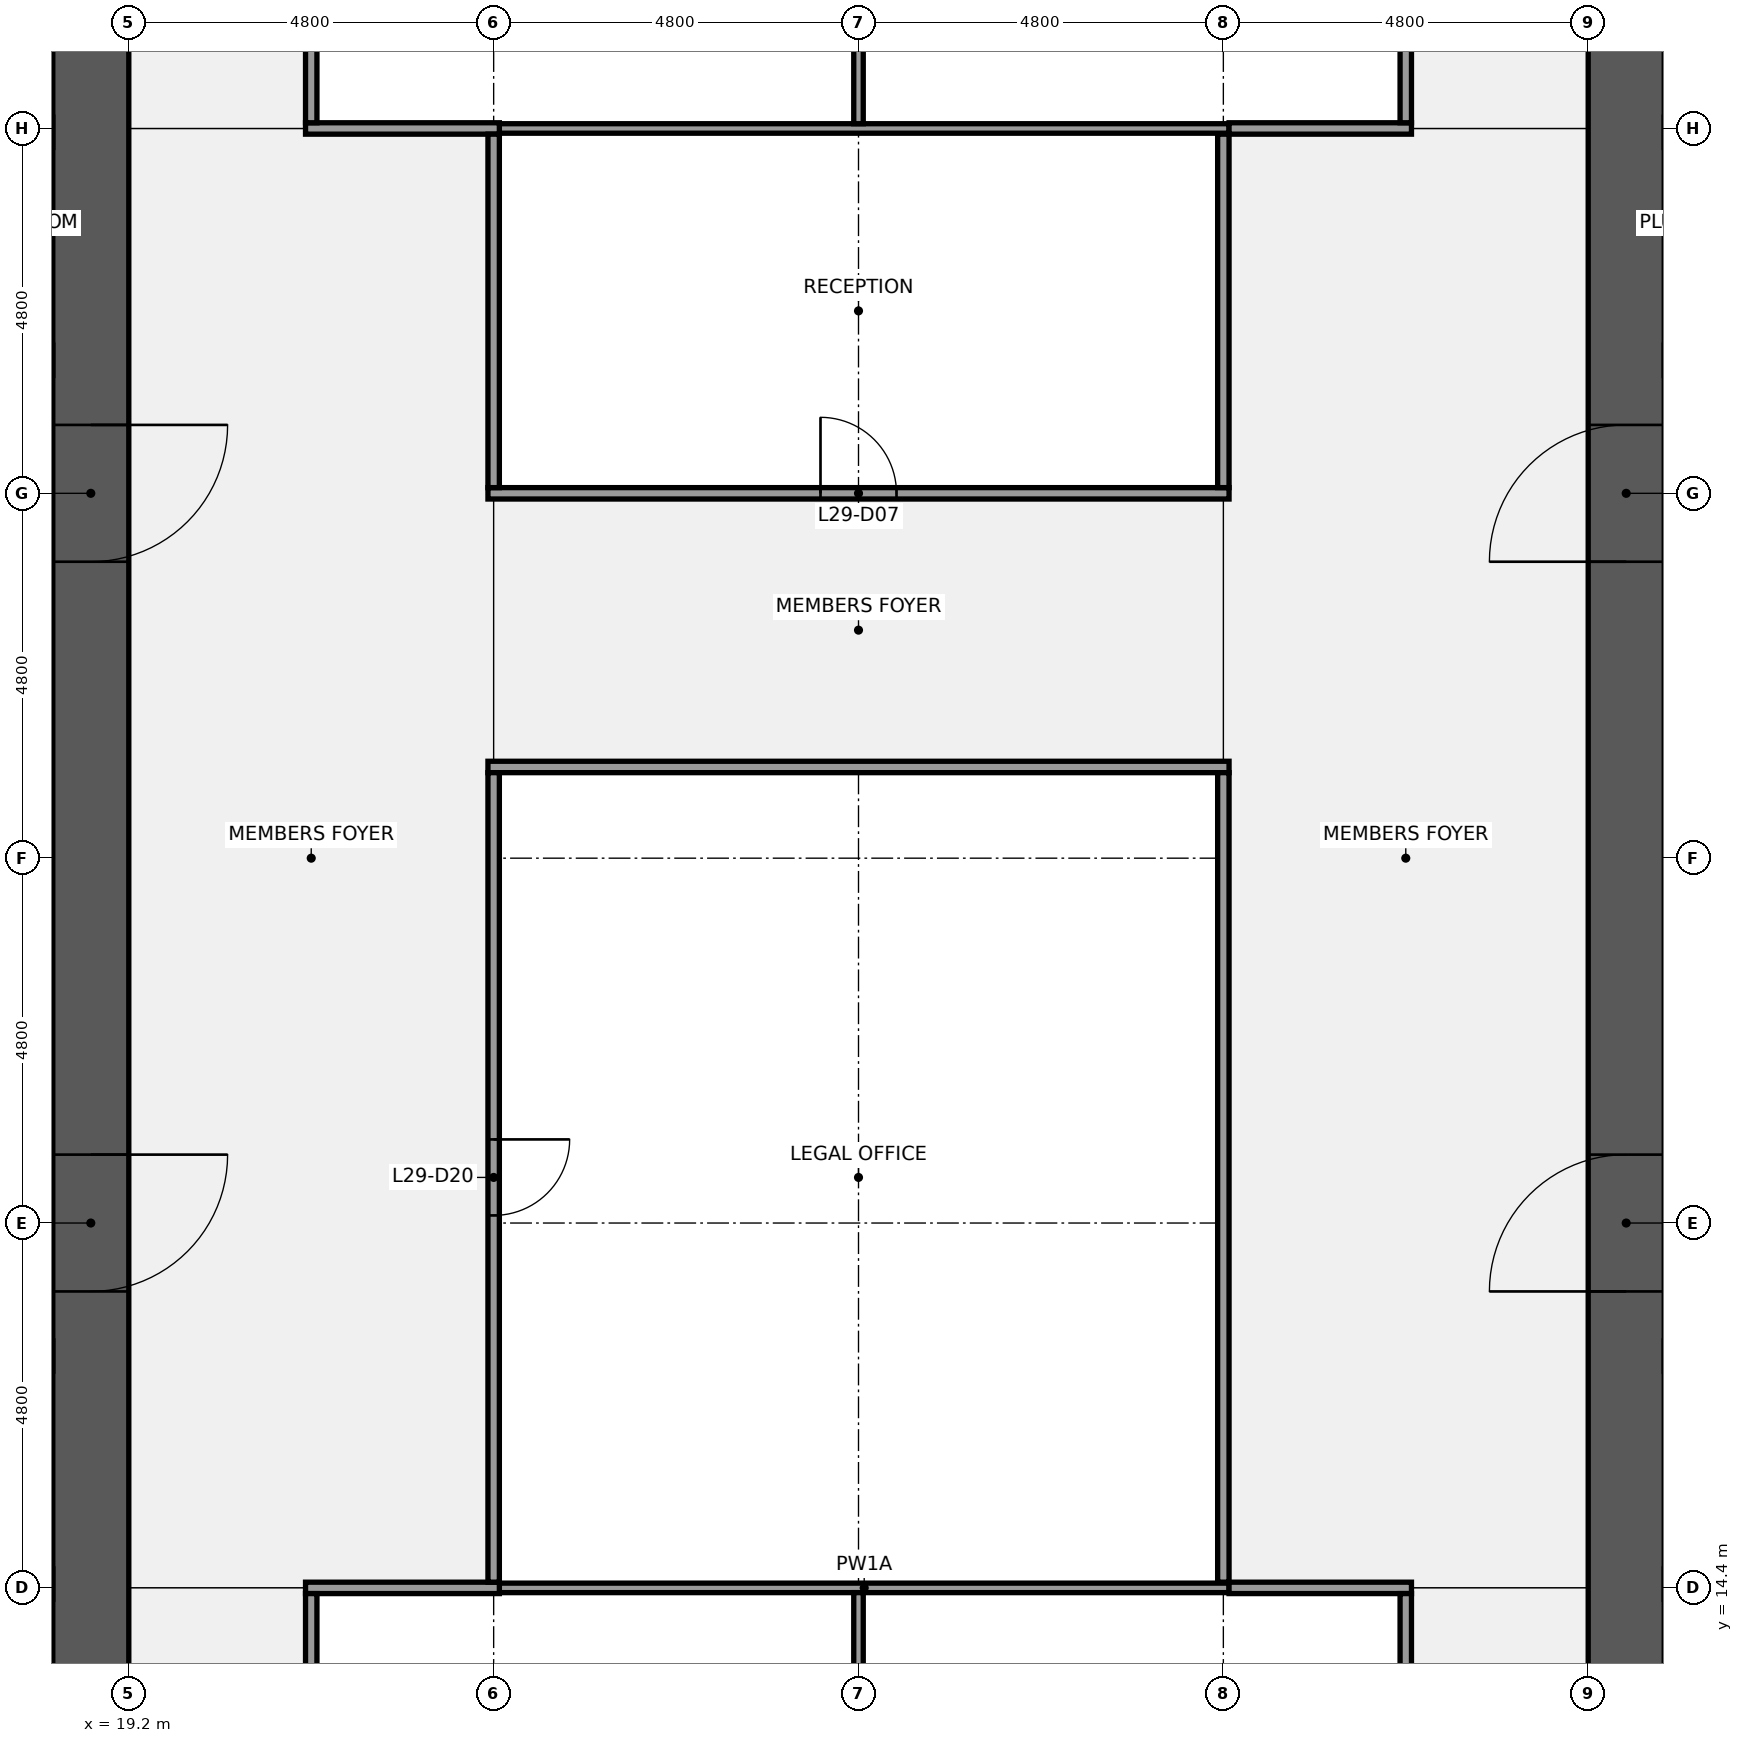
"""IFC4 building model, lengths in metres.
Left out: names, types, materials, properties, quantities, classifications, styles, units other than length and angle.
Written with IfcOpenShell. Run it as: python <this file> out.ifc"""

import sys

from ifc_helpers import new_model, si_unit, direction, frame, frame_2d, origin, place, context, subcontext, project, spatial, rectangle, extrude, element, fill, save


model = new_model("IFC4")
c1 = context("Model", 3, precision=1e-05, world=origin(), true_north=direction((0.0, 1.0)))
c2 = subcontext(c1, "Body", "Model", "MODEL_VIEW")
j1 = project(units=[si_unit("LENGTHUNIT", "METRE"), si_unit("PLANEANGLEUNIT", "RADIAN")], contexts=[c1])
p1 = place(None, origin())
s1 = spatial("IfcSite", under=j1, at=p1, CompositionType="ELEMENT")
p2 = place(p1, origin())
s2 = spatial("IfcBuilding", under=s1, at=p2, CompositionType="ELEMENT")
p3 = place(p2, frame((0.0, 0.0, 136.1)))
s3 = spatial("IfcBuildingStorey", under=s2, at=p3, CompositionType="ELEMENT", Elevation=136.1)
p4 = place(p3, frame((18.7, 38.4, 0.0), z_axis=(0.0, 0.0, 1.0), x_axis=(0.0, -1.0, 0.0)))
e1 = element("IfcWall", 1, at=p4, inside=s3, PredefinedType="SHEAR", context=c2, shape_type="SweptSolid", body=[
    extrude(rectangle(XDim=28.8, YDim=1.0, at=frame_2d((14.4, 0.0))), origin(), (0.0, 0.0, 1.0), 3.84),
])
p5 = place(p4, frame((18.3, 0.0, 0.0)))
e2 = element("IfcOpeningElement", 2, at=p5, cuts=e1, PredefinedType="OPENING", context=c2, shape_type="SweptSolid", body=[
    extrude(rectangle(XDim=1.8, YDim=2.1, at=frame_2d((0.9, 1.05))), frame((0.0, 0.51, 0.0), z_axis=(0.0, -1.0, 0.0), x_axis=(1.0, 0.0, 0.0)), (0.0, 0.0, 1.0), 1.02),
])
p6 = place(p4, frame((8.7, 0.0, 0.0)))
e3 = element("IfcOpeningElement", 3, at=p6, cuts=e1, PredefinedType="OPENING", context=c2, shape_type="SweptSolid", body=[
    extrude(rectangle(XDim=1.8, YDim=2.1, at=frame_2d((0.9, 1.05))), frame((0.0, 0.51, 0.0), z_axis=(0.0, -1.0, 0.0), x_axis=(1.0, 0.0, 0.0)), (0.0, 0.0, 1.0), 1.02),
])
p7 = place(p3, frame((1.0, 14.45, 0.0), z_axis=(0.0, 0.0, 1.0), x_axis=(1.0, 0.0, 0.0)))
e4 = element("IfcWall", 4, at=p7, inside=s3, PredefinedType="SHEAR", context=c2, shape_type="SweptSolid", body=[
    extrude(rectangle(XDim=17.2, YDim=0.4, at=frame_2d((8.6, 0.0))), origin(), (0.0, 0.0, 1.0), 3.84),
])
p8 = place(p3, frame((1.0, 17.45, 0.0), z_axis=(0.0, 0.0, 1.0), x_axis=(1.0, 0.0, 0.0)))
e5 = element("IfcWall", 5, at=p8, inside=s3, PredefinedType="SHEAR", context=c2, shape_type="SweptSolid", body=[
    extrude(rectangle(XDim=17.2, YDim=0.4, at=frame_2d((8.6, 0.0))), origin(), (0.0, 0.0, 1.0), 3.84),
])
p9 = place(p8, frame((0.762, 0.0, 0.0)))
e6 = element("IfcOpeningElement", 6, at=p9, cuts=e5, PredefinedType="OPENING", context=c2, shape_type="SweptSolid", body=[
    extrude(rectangle(XDim=1.0, YDim=2.1, at=frame_2d((0.5, 1.05))), frame((0.0, 0.21, 0.0), z_axis=(0.0, -1.0, 0.0), x_axis=(1.0, 0.0, 0.0)), (0.0, 0.0, 1.0), 0.42),
])
p10 = place(p8, frame((4.2, 0.0, 0.0)))
e7 = element("IfcOpeningElement", 7, at=p10, cuts=e5, PredefinedType="OPENING", context=c2, shape_type="SweptSolid", body=[
    extrude(rectangle(XDim=1.0, YDim=2.1, at=frame_2d((0.5, 1.05))), frame((0.0, 0.21, 0.0), z_axis=(0.0, -1.0, 0.0), x_axis=(1.0, 0.0, 0.0)), (0.0, 0.0, 1.0), 0.42),
])
p11 = place(p8, frame((8.4, 0.0, 0.0)))
e8 = element("IfcOpeningElement", 8, at=p11, cuts=e5, PredefinedType="OPENING", context=c2, shape_type="SweptSolid", body=[
    extrude(rectangle(XDim=1.0, YDim=2.1, at=frame_2d((0.5, 1.05))), frame((0.0, 0.21, 0.0), z_axis=(0.0, -1.0, 0.0), x_axis=(1.0, 0.0, 0.0)), (0.0, 0.0, 1.0), 0.42),
])
p12 = place(p8, frame((13.637, 0.0, 0.0)))
e9 = element("IfcOpeningElement", 9, at=p12, cuts=e5, PredefinedType="OPENING", context=c2, shape_type="SweptSolid", body=[
    extrude(rectangle(XDim=1.0, YDim=2.1, at=frame_2d((0.5, 1.05))), frame((0.0, 0.21, 0.0), z_axis=(0.0, -1.0, 0.0), x_axis=(1.0, 0.0, 0.0)), (0.0, 0.0, 1.0), 0.42),
])
p13 = place(p3, frame((1.0, 30.55, 0.0), z_axis=(0.0, 0.0, 1.0), x_axis=(1.0, 0.0, 0.0)))
e10 = element("IfcWall", 10, at=p13, inside=s3, PredefinedType="SHEAR", context=c2, shape_type="SweptSolid", body=[
    extrude(rectangle(XDim=17.2, YDim=0.4, at=frame_2d((8.6, 0.0))), origin(), (0.0, 0.0, 1.0), 3.84),
])
p14 = place(p13, frame((1.962, 0.0, 0.0)))
e11 = element("IfcOpeningElement", 11, at=p14, cuts=e10, PredefinedType="OPENING", context=c2, shape_type="SweptSolid", body=[
    extrude(rectangle(XDim=1.0, YDim=2.1, at=frame_2d((0.5, 1.05))), frame((0.0, 0.21, 0.0), z_axis=(0.0, -1.0, 0.0), x_axis=(1.0, 0.0, 0.0)), (0.0, 0.0, 1.0), 0.42),
])
p15 = place(p13, frame((6.6, 0.0, 0.0)))
e12 = element("IfcOpeningElement", 12, at=p15, cuts=e10, PredefinedType="OPENING", context=c2, shape_type="SweptSolid", body=[
    extrude(rectangle(XDim=1.0, YDim=2.1, at=frame_2d((0.5, 1.05))), frame((0.0, 0.21, 0.0), z_axis=(0.0, -1.0, 0.0), x_axis=(1.0, 0.0, 0.0)), (0.0, 0.0, 1.0), 0.42),
])
p16 = place(p13, frame((11.1, 0.0, 0.0)))
e13 = element("IfcOpeningElement", 13, at=p16, cuts=e10, PredefinedType="OPENING", context=c2, shape_type="SweptSolid", body=[
    extrude(rectangle(XDim=1.0, YDim=2.1, at=frame_2d((0.5, 1.05))), frame((0.0, 0.21, 0.0), z_axis=(0.0, -1.0, 0.0), x_axis=(1.0, 0.0, 0.0)), (0.0, 0.0, 1.0), 0.42),
])
p17 = place(p13, frame((15.137, 0.0, 0.0)))
e14 = element("IfcOpeningElement", 14, at=p17, cuts=e10, PredefinedType="OPENING", context=c2, shape_type="SweptSolid", body=[
    extrude(rectangle(XDim=1.0, YDim=2.1, at=frame_2d((0.5, 1.05))), frame((0.0, 0.21, 0.0), z_axis=(0.0, -1.0, 0.0), x_axis=(1.0, 0.0, 0.0)), (0.0, 0.0, 1.0), 0.42),
])
p18 = place(p3, frame((1.0, 33.55, 0.0), z_axis=(0.0, 0.0, 1.0), x_axis=(1.0, 0.0, 0.0)))
e15 = element("IfcWall", 15, at=p18, inside=s3, PredefinedType="SHEAR", context=c2, shape_type="SweptSolid", body=[
    extrude(rectangle(XDim=17.2, YDim=0.4, at=frame_2d((8.6, 0.0))), origin(), (0.0, 0.0, 1.0), 3.84),
])
p19 = place(p3, frame((38.9, 9.6, 0.0), z_axis=(0.0, 0.0, 1.0), x_axis=(0.0, 1.0, 0.0)))
e16 = element("IfcWall", 16, at=p19, inside=s3, PredefinedType="SHEAR", context=c2, shape_type="SweptSolid", body=[
    extrude(rectangle(XDim=28.8, YDim=1.0, at=frame_2d((14.4, 0.0))), origin(), (0.0, 0.0, 1.0), 3.84),
])
p20 = place(p19, frame((8.7, 0.0, 0.0)))
e17 = element("IfcOpeningElement", 17, at=p20, cuts=e16, PredefinedType="OPENING", context=c2, shape_type="SweptSolid", body=[
    extrude(rectangle(XDim=1.8, YDim=2.1, at=frame_2d((0.9, 1.05))), frame((0.0, 0.51, 0.0), z_axis=(0.0, -1.0, 0.0), x_axis=(1.0, 0.0, 0.0)), (0.0, 0.0, 1.0), 1.02),
])
p21 = place(p19, frame((18.3, 0.0, 0.0)))
e18 = element("IfcOpeningElement", 18, at=p21, cuts=e16, PredefinedType="OPENING", context=c2, shape_type="SweptSolid", body=[
    extrude(rectangle(XDim=1.8, YDim=2.1, at=frame_2d((0.9, 1.05))), frame((0.0, 0.51, 0.0), z_axis=(0.0, -1.0, 0.0), x_axis=(1.0, 0.0, 0.0)), (0.0, 0.0, 1.0), 1.02),
])
p22 = place(p3, frame((24.075, 14.4, 0.0), z_axis=(0.0, 0.0, 1.0), x_axis=(1.0, 0.0, 0.0)))
e19 = element("IfcWall", 19, at=p22, inside=s3, PredefinedType="PARTITIONING", context=c2, shape_type="SweptSolid", body=[
    extrude(rectangle(XDim=9.6, YDim=0.125, at=frame_2d((4.8, 0.0))), origin(), (0.0, 0.0, 1.0), 2.849),
])
p23 = place(p3, frame((21.525, 14.4, 0.0), z_axis=(0.0, 0.0, 1.0), x_axis=(1.0, 0.0, 0.0)))
e20 = element("IfcWall", 20, at=p23, inside=s3, PredefinedType="PARTITIONING", context=c2, shape_type="SweptSolid", body=[
    extrude(rectangle(XDim=2.55, YDim=0.15, at=frame_2d((1.275, 0.0))), origin(), (0.0, 0.0, 1.0), 2.849),
])
p24 = place(p3, frame((33.675, 14.4, 0.0), z_axis=(0.0, 0.0, 1.0), x_axis=(1.0, 0.0, 0.0)))
e21 = element("IfcWall", 21, at=p24, inside=s3, PredefinedType="PARTITIONING", context=c2, shape_type="SweptSolid", body=[
    extrude(rectangle(XDim=2.4, YDim=0.15, at=frame_2d((1.2, 0.0))), origin(), (0.0, 0.0, 1.0), 2.849),
])
p25 = place(p3, frame((23.925, 25.2, 0.0), z_axis=(0.0, 0.0, 1.0), x_axis=(1.0, 0.0, 0.0)))
e22 = element("IfcWall", 22, at=p25, inside=s3, PredefinedType="PARTITIONING", context=c2, shape_type="SweptSolid", body=[
    extrude(rectangle(XDim=9.75, YDim=0.15, at=frame_2d((4.875, 0.0))), origin(), (0.0, 0.0, 1.0), 2.849),
])
p26 = place(p3, frame((23.925, 28.8, 0.0), z_axis=(0.0, 0.0, 1.0), x_axis=(1.0, 0.0, 0.0)))
e23 = element("IfcWall", 23, at=p26, inside=s3, PredefinedType="PARTITIONING", context=c2, shape_type="SweptSolid", body=[
    extrude(rectangle(XDim=9.75, YDim=0.15, at=frame_2d((4.875, 0.0))), origin(), (0.0, 0.0, 1.0), 2.849),
])
p27 = place(p26, frame((4.375, 0.0, 0.0)))
e24 = element("IfcOpeningElement", 24, at=p27, cuts=e23, PredefinedType="OPENING", context=c2, shape_type="SweptSolid", body=[
    extrude(rectangle(XDim=1.0, YDim=2.1, at=frame_2d((0.5, 1.05))), frame((0.0, 0.085, 0.0), z_axis=(0.0, -1.0, 0.0), x_axis=(1.0, 0.0, 0.0)), (0.0, 0.0, 1.0), 0.17),
])
p28 = place(p3, frame((24.075, 33.6, 0.0), z_axis=(0.0, 0.0, 1.0), x_axis=(1.0, 0.0, 0.0)))
e25 = element("IfcWall", 25, at=p28, inside=s3, PredefinedType="PARTITIONING", context=c2, shape_type="SweptSolid", body=[
    extrude(rectangle(XDim=9.6, YDim=0.125, at=frame_2d((4.8, 0.0))), origin(), (0.0, 0.0, 1.0), 2.849),
])
p29 = place(p3, frame((21.525, 33.6, 0.0), z_axis=(0.0, 0.0, 1.0), x_axis=(1.0, 0.0, 0.0)))
e26 = element("IfcWall", 26, at=p29, inside=s3, PredefinedType="PARTITIONING", context=c2, shape_type="SweptSolid", body=[
    extrude(rectangle(XDim=2.55, YDim=0.15, at=frame_2d((1.275, 0.0))), origin(), (0.0, 0.0, 1.0), 2.849),
])
p30 = place(p3, frame((33.675, 33.6, 0.0), z_axis=(0.0, 0.0, 1.0), x_axis=(1.0, 0.0, 0.0)))
e27 = element("IfcWall", 27, at=p30, inside=s3, PredefinedType="PARTITIONING", context=c2, shape_type="SweptSolid", body=[
    extrude(rectangle(XDim=2.4, YDim=0.15, at=frame_2d((1.2, 0.0))), origin(), (0.0, 0.0, 1.0), 2.849),
])
for number, where, z_axis, x_axis in (
    (28, (21.6, 9.675, 0.0), (0.0, 0.0, 1.0), (0.0, 1.0, 0.0)),
    (29, (21.6, 33.675, 0.0), (0.0, 0.0, 1.0), (0.0, 1.0, 0.0)),
):
    element("IfcWall", number, at=place(p3, frame(where, z_axis=z_axis, x_axis=x_axis)), inside=s3, PredefinedType="PARTITIONING", context=c2, shape_type="SweptSolid", body=[
        extrude(rectangle(XDim=4.65, YDim=0.15, at=frame_2d((2.325, 0.0))), origin(), (0.0, 0.0, 1.0), 2.849),
    ])
p31 = place(p3, frame((24.0, 14.475, 0.0), z_axis=(0.0, 0.0, 1.0), x_axis=(0.0, 1.0, 0.0)))
e30 = element("IfcWall", 30, at=p31, inside=s3, PredefinedType="PARTITIONING", context=c2, shape_type="SweptSolid", body=[
    extrude(rectangle(XDim=10.65, YDim=0.15, at=frame_2d((5.325, 0.0))), origin(), (0.0, 0.0, 1.0), 2.849),
])
p32 = place(p31, frame((4.825, 0.0, 0.0)))
e31 = element("IfcOpeningElement", 31, at=p32, cuts=e30, PredefinedType="OPENING", context=c2, shape_type="SweptSolid", body=[
    extrude(rectangle(XDim=1.0, YDim=2.1, at=frame_2d((0.5, 1.05))), frame((0.0, 0.085, 0.0), z_axis=(0.0, -1.0, 0.0), x_axis=(1.0, 0.0, 0.0)), (0.0, 0.0, 1.0), 0.17),
])
p33 = place(p3, frame((24.0, 28.875, 0.0), z_axis=(0.0, 0.0, 1.0), x_axis=(0.0, 1.0, 0.0)))
e32 = element("IfcWall", 32, at=p33, inside=s3, PredefinedType="PARTITIONING", context=c2, shape_type="SweptSolid", body=[
    extrude(rectangle(XDim=4.65, YDim=0.15, at=frame_2d((2.325, 0.0))), origin(), (0.0, 0.0, 1.0), 2.849),
])
for number, where, z_axis, x_axis in (
    (33, (28.8, 9.675, 0.0), (0.0, 0.0, 1.0), (0.0, 1.0, 0.0)),
    (34, (28.8, 33.663, 0.0), (0.0, 0.0, 1.0), (0.0, 1.0, 0.0)),
):
    element("IfcWall", number, at=place(p3, frame(where, z_axis=z_axis, x_axis=x_axis)), inside=s3, PredefinedType="PARTITIONING", context=c2, shape_type="SweptSolid", body=[
        extrude(rectangle(XDim=4.662, YDim=0.125, at=frame_2d((2.331, 0.0))), origin(), (0.0, 0.0, 1.0), 2.849),
    ])
p34 = place(p3, frame((33.6, 14.475, 0.0), z_axis=(0.0, 0.0, 1.0), x_axis=(0.0, 1.0, 0.0)))
e35 = element("IfcWall", 35, at=p34, inside=s3, PredefinedType="PARTITIONING", context=c2, shape_type="SweptSolid", body=[
    extrude(rectangle(XDim=10.65, YDim=0.15, at=frame_2d((5.325, 0.0))), origin(), (0.0, 0.0, 1.0), 2.849),
])
for number, where, z_axis, x_axis in (
    (36, (33.6, 28.875, 0.0), (0.0, 0.0, 1.0), (0.0, 1.0, 0.0)),
    (37, (36.0, 9.675, 0.0), (0.0, 0.0, 1.0), (0.0, 1.0, 0.0)),
    (38, (36.0, 33.675, 0.0), (0.0, 0.0, 1.0), (0.0, 1.0, 0.0)),
):
    element("IfcWall", number, at=place(p3, frame(where, z_axis=z_axis, x_axis=x_axis)), inside=s3, PredefinedType="PARTITIONING", context=c2, shape_type="SweptSolid", body=[
        extrude(rectangle(XDim=4.65, YDim=0.15, at=frame_2d((2.325, 0.0))), origin(), (0.0, 0.0, 1.0), 2.849),
    ])
p35 = place(p5, origin())
e39 = element("IfcDoor", 39, at=p35, inside=s3, OperationType="DOUBLE_DOOR_SINGLE_SWING", PredefinedType="DOOR", context=c2, shape_type="SweptSolid", body=[
    extrude(rectangle(XDim=1.8, YDim=2.1, at=frame_2d((0.9, 1.05))), frame((0.0, 0.025, 0.0), z_axis=(0.0, -1.0, 0.0), x_axis=(1.0, 0.0, 0.0)), (0.0, 0.0, 1.0), 0.05),
])
fill(e2, e39)
p36 = place(p6, origin())
e40 = element("IfcDoor", 40, at=p36, inside=s3, OperationType="DOUBLE_DOOR_SINGLE_SWING", PredefinedType="DOOR", context=c2, shape_type="SweptSolid", body=[
    extrude(rectangle(XDim=1.8, YDim=2.1, at=frame_2d((0.9, 1.05))), frame((0.0, 0.025, 0.0), z_axis=(0.0, -1.0, 0.0), x_axis=(1.0, 0.0, 0.0)), (0.0, 0.0, 1.0), 0.05),
])
fill(e3, e40)
p37 = place(p20, origin())
e41 = element("IfcDoor", 41, at=p37, inside=s3, OperationType="DOUBLE_DOOR_SINGLE_SWING", PredefinedType="DOOR", context=c2, shape_type="SweptSolid", body=[
    extrude(rectangle(XDim=1.8, YDim=2.1, at=frame_2d((0.9, 1.05))), frame((0.0, 0.025, 0.0), z_axis=(0.0, -1.0, 0.0), x_axis=(1.0, 0.0, 0.0)), (0.0, 0.0, 1.0), 0.05),
])
fill(e17, e41)
p38 = place(p21, origin())
e42 = element("IfcDoor", 42, at=p38, inside=s3, OperationType="DOUBLE_DOOR_SINGLE_SWING", PredefinedType="DOOR", context=c2, shape_type="SweptSolid", body=[
    extrude(rectangle(XDim=1.8, YDim=2.1, at=frame_2d((0.9, 1.05))), frame((0.0, 0.025, 0.0), z_axis=(0.0, -1.0, 0.0), x_axis=(1.0, 0.0, 0.0)), (0.0, 0.0, 1.0), 0.05),
])
fill(e18, e42)
p39 = place(p27, origin())
e43 = element("IfcDoor", 43, at=p39, inside=s3, OperationType="SINGLE_SWING_LEFT", PredefinedType="DOOR", context=c2, shape_type="SweptSolid", body=[
    extrude(rectangle(XDim=1.0, YDim=2.1, at=frame_2d((0.5, 1.05))), frame((0.0, 0.025, 0.0), z_axis=(0.0, -1.0, 0.0), x_axis=(1.0, 0.0, 0.0)), (0.0, 0.0, 1.0), 0.05),
])
fill(e24, e43)
p40 = place(p32, origin())
e44 = element("IfcDoor", 44, at=p40, inside=s3, OperationType="SINGLE_SWING_RIGHT", PredefinedType="DOOR", context=c2, shape_type="SweptSolid", body=[
    extrude(rectangle(XDim=1.0, YDim=2.1, at=frame_2d((0.5, 1.05))), frame((0.0, 0.025, 0.0), z_axis=(0.0, -1.0, 0.0), x_axis=(1.0, 0.0, 0.0)), (0.0, 0.0, 1.0), 0.05),
])
fill(e31, e44)
save(model, sys.argv[1])
